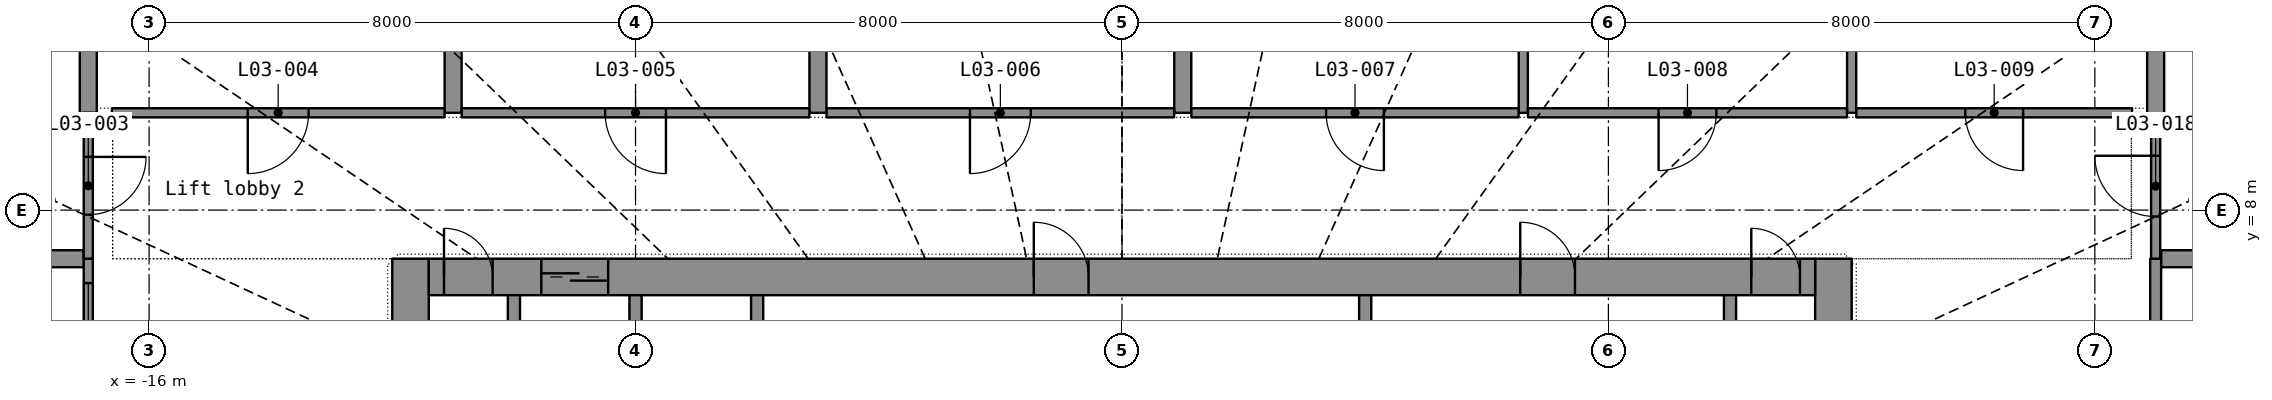
"""IFC4 building model, lengths in metres.
Left out: names, types, materials, properties, quantities, classifications, styles, units other than length and angle.
Written with IfcOpenShell. Run it as: python <this file> out.ifc"""

import sys

from ifc_helpers import new_model, si_unit, direction, frame, frame_2d, origin, place, context, subcontext, project, spatial, rectangle, extrude, element, fill, save


model = new_model("IFC4")
c1 = context("Model", 3, precision=1e-05, world=origin(), true_north=direction((0.0, 1.0)))
c2 = subcontext(c1, "Body", "Model", "MODEL_VIEW")
j1 = project(units=[si_unit("LENGTHUNIT", "METRE"), si_unit("PLANEANGLEUNIT", "RADIAN")], contexts=[c1])
p1 = place(None, origin())
s1 = spatial("IfcSite", under=j1, at=p1, CompositionType="ELEMENT")
p2 = place(p1, origin())
s2 = spatial("IfcBuilding", under=s1, at=p2, CompositionType="ELEMENT")
p3 = place(p2, frame((0.0, 0.0, 20.0)))
s3 = spatial("IfcBuildingStorey", under=s2, at=p3, CompositionType="ELEMENT", Elevation=20.0)
p4 = place(p3, frame((-11.7, -7.2, 0.0), z_axis=(0.0, 0.0, 1.0), x_axis=(0.0, 1.0, 0.0)))
e1 = element("IfcWall", 1, at=p4, inside=s3, PredefinedType="SHEAR", context=c2, shape_type="SweptSolid", body=[
    extrude(rectangle(XDim=14.4, YDim=0.6, at=frame_2d((7.2, 0.0))), origin(), (0.0, 0.0, 1.0), 4.1),
])
p5 = place(p4, frame((6.5, 0.0, 0.0)))
e2 = element("IfcOpeningElement", 2, at=p5, cuts=e1, PredefinedType="OPENING", context=c2, shape_type="SweptSolid", body=[
    extrude(rectangle(XDim=1.4, YDim=2.2, at=frame_2d((0.7, 1.1))), frame((0.0, 0.31, 0.0), z_axis=(0.0, -1.0, 0.0), x_axis=(1.0, 0.0, 0.0)), (0.0, 0.0, 1.0), 0.62),
])
p6 = place(p3, frame((11.7, -7.2, 0.0), z_axis=(0.0, 0.0, 1.0), x_axis=(0.0, 1.0, 0.0)))
e3 = element("IfcWall", 3, at=p6, inside=s3, PredefinedType="SHEAR", context=c2, shape_type="SweptSolid", body=[
    extrude(rectangle(XDim=14.4, YDim=0.6, at=frame_2d((7.2, 0.0))), origin(), (0.0, 0.0, 1.0), 4.1),
])
p7 = place(p6, frame((6.5, 0.0, 0.0)))
e4 = element("IfcOpeningElement", 4, at=p7, cuts=e3, PredefinedType="OPENING", context=c2, shape_type="SweptSolid", body=[
    extrude(rectangle(XDim=1.4, YDim=2.2, at=frame_2d((0.7, 1.1))), frame((0.0, 0.31, 0.0), z_axis=(0.0, -1.0, 0.0), x_axis=(1.0, 0.0, 0.0)), (0.0, 0.0, 1.0), 0.62),
])
p8 = place(p3, frame((-11.4, 6.9, 0.0), z_axis=(0.0, 0.0, 1.0), x_axis=(1.0, 0.0, 0.0)))
e5 = element("IfcWall", 5, at=p8, inside=s3, PredefinedType="SHEAR", context=c2, shape_type="SweptSolid", body=[
    extrude(rectangle(XDim=22.8, YDim=0.6, at=frame_2d((11.4, 0.0))), origin(), (0.0, 0.0, 1.0), 4.1),
])
p9 = place(p8, frame((1.85, 0.0, 0.0)))
e6 = element("IfcOpeningElement", 6, at=p9, cuts=e5, PredefinedType="OPENING", context=c2, shape_type="SweptSolid", body=[
    extrude(rectangle(XDim=1.1, YDim=2.2, at=frame_2d((0.55, 1.1))), frame((0.0, 0.31, 0.0), z_axis=(0.0, -1.0, 0.0), x_axis=(1.0, 0.0, 0.0)), (0.0, 0.0, 1.0), 0.62),
])
p10 = place(p8, frame((9.95, 0.0, 0.0)))
e7 = element("IfcOpeningElement", 7, at=p10, cuts=e5, PredefinedType="OPENING", context=c2, shape_type="SweptSolid", body=[
    extrude(rectangle(XDim=0.9, YDim=2.1, at=frame_2d((0.45, 1.05))), frame((0.0, 0.31, 0.0), z_axis=(0.0, -1.0, 0.0), x_axis=(1.0, 0.0, 0.0)), (0.0, 0.0, 1.0), 0.62),
])
p11 = place(p8, frame((17.95, 0.0, 0.0)))
e8 = element("IfcOpeningElement", 8, at=p11, cuts=e5, PredefinedType="OPENING", context=c2, shape_type="SweptSolid", body=[
    extrude(rectangle(XDim=0.9, YDim=2.1, at=frame_2d((0.45, 1.05))), frame((0.0, 0.31, 0.0), z_axis=(0.0, -1.0, 0.0), x_axis=(1.0, 0.0, 0.0)), (0.0, 0.0, 1.0), 0.62),
])
p12 = place(p8, frame((0.25, 0.0, 0.0)))
e9 = element("IfcOpeningElement", 9, at=p12, cuts=e5, PredefinedType="OPENING", context=c2, shape_type="SweptSolid", body=[
    extrude(rectangle(XDim=0.8, YDim=2.05, at=frame_2d((0.4, 1.025))), frame((0.0, 0.31, 0.0), z_axis=(0.0, -1.0, 0.0), x_axis=(1.0, 0.0, 0.0)), (0.0, 0.0, 1.0), 0.62),
])
p13 = place(p8, frame((21.75, 0.0, 0.0)))
e10 = element("IfcOpeningElement", 10, at=p13, cuts=e5, PredefinedType="OPENING", context=c2, shape_type="SweptSolid", body=[
    extrude(rectangle(XDim=0.8, YDim=2.05, at=frame_2d((0.4, 1.025))), frame((0.0, 0.31, 0.0), z_axis=(0.0, -1.0, 0.0), x_axis=(1.0, 0.0, 0.0)), (0.0, 0.0, 1.0), 0.62),
])
for number, where, z_axis, x_axis in (
    (11, (-10.0, 3.9, 0.0), (0.0, 0.0, 1.0), (0.0, 1.0, 0.0)),
    (12, (-8.0, 3.9, 0.0), (0.0, 0.0, 1.0), (0.0, 1.0, 0.0)),
    (13, (-6.0, 3.9, 0.0), (0.0, 0.0, 1.0), (0.0, 1.0, 0.0)),
    (14, (10.0, 3.9, 0.0), (0.0, 0.0, 1.0), (0.0, 1.0, 0.0)),
):
    element("IfcWall", number, at=place(p3, frame(where, z_axis=z_axis, x_axis=x_axis)), inside=s3, PredefinedType="SHEAR", context=c2, shape_type="SweptSolid", body=[
        extrude(rectangle(XDim=2.7, YDim=0.2, at=frame_2d((1.35, 0.0))), origin(), (0.0, 0.0, 1.0), 4.1),
    ])
p14 = place(p3, frame((4.0, 3.9, 0.0), z_axis=(0.0, 0.0, 1.0), x_axis=(0.0, 1.0, 0.0)))
e15 = element("IfcWall", 15, at=p14, inside=s3, PredefinedType="PARTITIONING", context=c2, shape_type="SweptSolid", body=[
    extrude(rectangle(XDim=2.7, YDim=0.2, at=frame_2d((1.35, 0.0))), origin(), (0.0, 0.0, 1.0), 4.1),
])
p15 = place(p3, frame((-17.0, 7.2, 0.0), z_axis=(0.0, 0.0, 1.0), x_axis=(0.0, -1.0, 0.0)))
e16 = element("IfcWall", 16, at=p15, inside=s3, PredefinedType="PARTITIONING", context=c2, shape_type="SweptSolid", body=[
    extrude(rectangle(XDim=14.4, YDim=0.15, at=frame_2d((7.2, 0.0))), origin(), (0.0, 0.0, 1.0), 3.3),
])
p16 = place(p15, frame((6.7, 0.0, 0.0)))
e17 = element("IfcOpeningElement", 17, at=p16, cuts=e16, PredefinedType="OPENING", context=c2, shape_type="SweptSolid", body=[
    extrude(rectangle(XDim=1.0, YDim=2.2, at=frame_2d((0.5, 1.1))), frame((0.0, 0.085, 0.0), z_axis=(0.0, -1.0, 0.0), x_axis=(1.0, 0.0, 0.0)), (0.0, 0.0, 1.0), 0.17),
])
p17 = place(p15, frame((0.4, 0.0, 1.0)))
e18 = element("IfcOpeningElement", 18, at=p17, cuts=e16, PredefinedType="OPENING", context=c2, shape_type="SweptSolid", body=[
    extrude(rectangle(XDim=2.4, YDim=1.2, at=frame_2d((1.2, 0.6))), frame((0.0, 0.085, 0.0), z_axis=(0.0, -1.0, 0.0), x_axis=(1.0, 0.0, 0.0)), (0.0, 0.0, 1.0), 0.17),
])
p18 = place(p3, frame((17.0, -7.2, 0.0), z_axis=(0.0, 0.0, 1.0), x_axis=(0.0, 1.0, 0.0)))
e19 = element("IfcWall", 19, at=p18, inside=s3, PredefinedType="PARTITIONING", context=c2, shape_type="SweptSolid", body=[
    extrude(rectangle(XDim=14.4, YDim=0.18, at=frame_2d((7.2, 0.0))), origin(), (0.0, 0.0, 1.0), 3.3),
])
p19 = place(p18, frame((6.725, 0.0, 0.0)))
e20 = element("IfcOpeningElement", 20, at=p19, cuts=e19, PredefinedType="OPENING", context=c2, shape_type="SweptSolid", body=[
    extrude(rectangle(XDim=0.95, YDim=2.15, at=frame_2d((0.475, 1.075))), frame((0.0, 0.1, 0.0), z_axis=(0.0, -1.0, 0.0), x_axis=(1.0, 0.0, 0.0)), (0.0, 0.0, 1.0), 0.2),
])
p20 = place(p3, frame((1.0, 9.6, 0.0), z_axis=(0.0, 0.0, 1.0), x_axis=(0.0, 1.0, 0.0)))
e21 = element("IfcWall", 21, at=p20, inside=s3, PredefinedType="PARTITIONING", context=c2, shape_type="SweptSolid", body=[
    extrude(rectangle(XDim=13.8, YDim=0.28, at=frame_2d((6.9, 0.0))), origin(), (0.0, 0.0, 1.0), 3.3),
])
p21 = place(p3, frame((-5.0, 9.6, 0.0), z_axis=(0.0, 0.0, 1.0), x_axis=(0.0, 1.0, 0.0)))
e22 = element("IfcWall", 22, at=p21, inside=s3, PredefinedType="PARTITIONING", context=c2, shape_type="SweptSolid", body=[
    extrude(rectangle(XDim=13.426, YDim=0.28, at=frame_2d((6.713, 0.0))), origin(), (0.0, 0.0, 1.0), 3.3),
])
p22 = place(p3, frame((6.6, 9.6, 0.0), z_axis=(0.0, 0.0, 1.0), x_axis=(0.0, 1.0, 0.0)))
e23 = element("IfcWall", 23, at=p22, inside=s3, PredefinedType="PARTITIONING", context=c2, shape_type="SweptSolid", body=[
    extrude(rectangle(XDim=13.196, YDim=0.15, at=frame_2d((6.598, 0.0))), origin(), (0.0, 0.0, 1.0), 3.3),
])
p23 = place(p3, frame((-11.0, 9.6, 0.0), z_axis=(0.0, 0.0, 1.0), x_axis=(0.0, 1.0, 0.0)))
e24 = element("IfcWall", 24, at=p23, inside=s3, PredefinedType="PARTITIONING", context=c2, shape_type="SweptSolid", body=[
    extrude(rectangle(XDim=11.962, YDim=0.28, at=frame_2d((5.981, 0.0))), origin(), (0.0, 0.0, 1.0), 3.3),
])
p24 = place(p3, frame((12.0, 9.6, 0.0), z_axis=(0.0, 0.0, 1.0), x_axis=(0.0, 1.0, 0.0)))
e25 = element("IfcWall", 25, at=p24, inside=s3, PredefinedType="PARTITIONING", context=c2, shape_type="SweptSolid", body=[
    extrude(rectangle(XDim=11.623, YDim=0.15, at=frame_2d((5.811, 0.0))), origin(), (0.0, 0.0, 1.0), 3.3),
])
p25 = place(p3, frame((-17.077, 7.2, 0.0), z_axis=(0.0, 0.0, 1.0), x_axis=(-1.0, 0.0, 0.0)))
e26 = element("IfcWall", 26, at=p25, inside=s3, PredefinedType="PARTITIONING", context=c2, shape_type="SweptSolid", body=[
    extrude(rectangle(XDim=10.086, YDim=0.28, at=frame_2d((5.043, 0.0))), origin(), (0.0, 0.0, 1.0), 3.3),
])
p26 = place(p25, frame((3.843, 0.0, 1.0)))
e27 = element("IfcOpeningElement", 27, at=p26, cuts=e26, PredefinedType="OPENING", context=c2, shape_type="SweptSolid", body=[
    extrude(rectangle(XDim=2.4, YDim=1.2, at=frame_2d((1.2, 0.6))), frame((0.0, 0.15, 0.0), z_axis=(0.0, -1.0, 0.0), x_axis=(1.0, 0.0, 0.0)), (0.0, 0.0, 1.0), 0.3),
])
p27 = place(p3, frame((27.163, 7.2, 0.0), z_axis=(0.0, 0.0, 1.0), x_axis=(-1.0, 0.0, 0.0)))
e28 = element("IfcWall", 28, at=p27, inside=s3, PredefinedType="PARTITIONING", context=c2, shape_type="SweptSolid", body=[
    extrude(rectangle(XDim=10.071, YDim=0.28, at=frame_2d((5.035, 0.0))), origin(), (0.0, 0.0, 1.0), 3.3),
])
p28 = place(p27, frame((3.835, 0.0, 1.0)))
e29 = element("IfcOpeningElement", 29, at=p28, cuts=e28, PredefinedType="OPENING", context=c2, shape_type="SweptSolid", body=[
    extrude(rectangle(XDim=2.4, YDim=1.2, at=frame_2d((1.2, 0.6))), frame((0.0, 0.15, 0.0), z_axis=(0.0, -1.0, 0.0), x_axis=(1.0, 0.0, 0.0)), (0.0, 0.0, 1.0), 0.3),
])
p29 = place(p3, frame((17.0, 9.588, 0.0), z_axis=(0.0, 0.0, 1.0), x_axis=(0.0, 1.0, 0.0)))
e30 = element("IfcWall", 30, at=p29, inside=s3, PredefinedType="PARTITIONING", context=c2, shape_type="SweptSolid", body=[
    extrude(rectangle(XDim=9.189, YDim=0.28, at=frame_2d((4.594, 0.0))), origin(), (0.0, 0.0, 1.0), 3.3),
])
p30 = place(p29, frame((3.394, 0.0, 1.0)))
e31 = element("IfcOpeningElement", 31, at=p30, cuts=e30, PredefinedType="OPENING", context=c2, shape_type="SweptSolid", body=[
    extrude(rectangle(XDim=2.4, YDim=1.2, at=frame_2d((1.2, 0.6))), frame((0.0, 0.15, 0.0), z_axis=(0.0, -1.0, 0.0), x_axis=(1.0, 0.0, 0.0)), (0.0, 0.0, 1.0), 0.3),
])
p31 = place(p3, frame((-17.0, 9.6, 0.0), z_axis=(0.0, 0.0, 1.0), x_axis=(0.0, 1.0, 0.0)))
e32 = element("IfcWall", 32, at=p31, inside=s3, PredefinedType="PARTITIONING", context=c2, shape_type="SweptSolid", body=[
    extrude(rectangle(XDim=9.177, YDim=0.28, at=frame_2d((4.588, 0.0))), origin(), (0.0, 0.0, 1.0), 3.3),
])
p32 = place(p3, frame((-5.142, 9.6, 0.0), z_axis=(0.0, 0.0, 1.0), x_axis=(-1.0, 0.0, 0.0)))
e33 = element("IfcWall", 33, at=p32, inside=s3, PredefinedType="PARTITIONING", context=c2, shape_type="SweptSolid", body=[
    extrude(rectangle(XDim=5.716, YDim=0.15, at=frame_2d((2.858, 0.0))), origin(), (0.0, 0.0, 1.0), 3.3),
])
p33 = place(p32, frame((2.358, 0.0, 0.0)))
e34 = element("IfcOpeningElement", 34, at=p33, cuts=e33, PredefinedType="OPENING", context=c2, shape_type="SweptSolid", body=[
    extrude(rectangle(XDim=1.0, YDim=2.2, at=frame_2d((0.5, 1.1))), frame((0.0, 0.085, 0.0), z_axis=(0.0, -1.0, 0.0), x_axis=(1.0, 0.0, 0.0)), (0.0, 0.0, 1.0), 0.17),
])
p34 = place(p3, frame((0.858, 9.6, 0.0), z_axis=(0.0, 0.0, 1.0), x_axis=(-1.0, 0.0, 0.0)))
e35 = element("IfcWall", 35, at=p34, inside=s3, PredefinedType="PARTITIONING", context=c2, shape_type="SweptSolid", body=[
    extrude(rectangle(XDim=5.716, YDim=0.15, at=frame_2d((2.858, 0.0))), origin(), (0.0, 0.0, 1.0), 3.3),
])
p35 = place(p34, frame((2.358, 0.0, 0.0)))
e36 = element("IfcOpeningElement", 36, at=p35, cuts=e35, PredefinedType="OPENING", context=c2, shape_type="SweptSolid", body=[
    extrude(rectangle(XDim=1.0, YDim=2.2, at=frame_2d((0.5, 1.1))), frame((0.0, 0.085, 0.0), z_axis=(0.0, -1.0, 0.0), x_axis=(1.0, 0.0, 0.0)), (0.0, 0.0, 1.0), 0.17),
])
p36 = place(p3, frame((-11.142, 9.6, 0.0), z_axis=(0.0, 0.0, 1.0), x_axis=(-1.0, 0.0, 0.0)))
e37 = element("IfcWall", 37, at=p36, inside=s3, PredefinedType="PARTITIONING", context=c2, shape_type="SweptSolid", body=[
    extrude(rectangle(XDim=5.47, YDim=0.15, at=frame_2d((2.735, 0.0))), origin(), (0.0, 0.0, 1.0), 3.3),
])
p37 = place(p36, frame((2.235, 0.0, 0.0)))
e38 = element("IfcOpeningElement", 38, at=p37, cuts=e37, PredefinedType="OPENING", context=c2, shape_type="SweptSolid", body=[
    extrude(rectangle(XDim=1.0, YDim=2.2, at=frame_2d((0.5, 1.1))), frame((0.0, 0.085, 0.0), z_axis=(0.0, -1.0, 0.0), x_axis=(1.0, 0.0, 0.0)), (0.0, 0.0, 1.0), 0.17),
])
p38 = place(p3, frame((6.523, 9.6, 0.0), z_axis=(0.0, 0.0, 1.0), x_axis=(-1.0, 0.0, 0.0)))
e39 = element("IfcWall", 39, at=p38, inside=s3, PredefinedType="PARTITIONING", context=c2, shape_type="SweptSolid", body=[
    extrude(rectangle(XDim=5.381, YDim=0.15, at=frame_2d((2.69, 0.0))), origin(), (0.0, 0.0, 1.0), 3.3),
])
p39 = place(p38, frame((2.216, 0.0, 0.0)))
e40 = element("IfcOpeningElement", 40, at=p39, cuts=e39, PredefinedType="OPENING", context=c2, shape_type="SweptSolid", body=[
    extrude(rectangle(XDim=0.95, YDim=2.15, at=frame_2d((0.475, 1.075))), frame((0.0, 0.085, 0.0), z_axis=(0.0, -1.0, 0.0), x_axis=(1.0, 0.0, 0.0)), (0.0, 0.0, 1.0), 0.17),
])
p40 = place(p3, frame((11.923, 9.6, 0.0), z_axis=(0.0, 0.0, 1.0), x_axis=(-1.0, 0.0, 0.0)))
e41 = element("IfcWall", 41, at=p40, inside=s3, PredefinedType="PARTITIONING", context=c2, shape_type="SweptSolid", body=[
    extrude(rectangle(XDim=5.246, YDim=0.15, at=frame_2d((2.623, 0.0))), origin(), (0.0, 0.0, 1.0), 3.3),
])
p41 = place(p40, frame((2.148, 0.0, 0.0)))
e42 = element("IfcOpeningElement", 42, at=p41, cuts=e41, PredefinedType="OPENING", context=c2, shape_type="SweptSolid", body=[
    extrude(rectangle(XDim=0.95, YDim=2.15, at=frame_2d((0.475, 1.075))), frame((0.0, 0.085, 0.0), z_axis=(0.0, -1.0, 0.0), x_axis=(1.0, 0.0, 0.0)), (0.0, 0.0, 1.0), 0.17),
])
p42 = place(p3, frame((16.612, 9.6, 0.0), z_axis=(0.0, 0.0, 1.0), x_axis=(-1.0, 0.0, 0.0)))
e43 = element("IfcWall", 43, at=p42, inside=s3, PredefinedType="PARTITIONING", context=c2, shape_type="SweptSolid", body=[
    extrude(rectangle(XDim=4.535, YDim=0.15, at=frame_2d((2.268, 0.0))), origin(), (0.0, 0.0, 1.0), 3.3),
])
p43 = place(p42, frame((1.792, 0.0, 0.0)))
e44 = element("IfcOpeningElement", 44, at=p43, cuts=e43, PredefinedType="OPENING", context=c2, shape_type="SweptSolid", body=[
    extrude(rectangle(XDim=0.95, YDim=2.15, at=frame_2d((0.475, 1.075))), frame((0.0, 0.085, 0.0), z_axis=(0.0, -1.0, 0.0), x_axis=(1.0, 0.0, 0.0)), (0.0, 0.0, 1.0), 0.17),
])
p44 = place(p3, frame((-17.0, 9.599, 0.0), z_axis=(0.0, 0.0, 1.0), x_axis=(0.0, -1.0, 0.0)))
e45 = element("IfcWall", 45, at=p44, inside=s3, PredefinedType="PARTITIONING", context=c2, shape_type="SweptSolid", body=[
    extrude(rectangle(XDim=2.398, YDim=0.15, at=frame_2d((1.199, 0.0))), origin(), (0.0, 0.0, 1.0), 3.3),
])
p45 = place(p44, frame((0.724, 0.0, 0.0)))
e46 = element("IfcOpeningElement", 46, at=p45, cuts=e45, PredefinedType="OPENING", context=c2, shape_type="SweptSolid", body=[
    extrude(rectangle(XDim=0.95, YDim=2.15, at=frame_2d((0.475, 1.075))), frame((0.0, 0.085, 0.0), z_axis=(0.0, -1.0, 0.0), x_axis=(1.0, 0.0, 0.0)), (0.0, 0.0, 1.0), 0.17),
])
p46 = place(p3, frame((17.0, 7.201, 0.0), z_axis=(0.0, 0.0, 1.0), x_axis=(0.0, 1.0, 0.0)))
e47 = element("IfcWall", 47, at=p46, inside=s3, PredefinedType="PARTITIONING", context=c2, shape_type="SweptSolid", body=[
    extrude(rectangle(XDim=2.386, YDim=0.15, at=frame_2d((1.193, 0.0))), origin(), (0.0, 0.0, 1.0), 3.3),
])
p47 = place(p46, frame((0.693, 0.0, 0.0)))
e48 = element("IfcOpeningElement", 48, at=p47, cuts=e47, PredefinedType="OPENING", context=c2, shape_type="SweptSolid", body=[
    extrude(rectangle(XDim=1.0, YDim=2.2, at=frame_2d((0.5, 1.1))), frame((0.0, 0.085, 0.0), z_axis=(0.0, -1.0, 0.0), x_axis=(1.0, 0.0, 0.0)), (0.0, 0.0, 1.0), 0.17),
])
p48 = place(p9, origin())
e49 = element("IfcDoor", 49, at=p48, inside=s3, OperationType="DOUBLE_DOOR_SLIDING", PredefinedType="DOOR", context=c2, shape_type="SweptSolid", body=[
    extrude(rectangle(XDim=1.1, YDim=2.2, at=frame_2d((0.55, 1.1))), frame((0.0, 0.025, 0.0), z_axis=(0.0, -1.0, 0.0), x_axis=(1.0, 0.0, 0.0)), (0.0, 0.0, 1.0), 0.05),
])
fill(e6, e49)
p49 = place(p10, origin())
e50 = element("IfcDoor", 50, at=p49, inside=s3, OperationType="SINGLE_SWING_LEFT", PredefinedType="DOOR", context=c2, shape_type="SweptSolid", body=[
    extrude(rectangle(XDim=0.9, YDim=2.1, at=frame_2d((0.45, 1.05))), frame((0.0, 0.025, 0.0), z_axis=(0.0, -1.0, 0.0), x_axis=(1.0, 0.0, 0.0)), (0.0, 0.0, 1.0), 0.05),
])
fill(e7, e50)
p50 = place(p11, origin())
e51 = element("IfcDoor", 51, at=p50, inside=s3, OperationType="SINGLE_SWING_LEFT", PredefinedType="DOOR", context=c2, shape_type="SweptSolid", body=[
    extrude(rectangle(XDim=0.9, YDim=2.1, at=frame_2d((0.45, 1.05))), frame((0.0, 0.025, 0.0), z_axis=(0.0, -1.0, 0.0), x_axis=(1.0, 0.0, 0.0)), (0.0, 0.0, 1.0), 0.05),
])
fill(e8, e51)
p51 = place(p12, origin())
e52 = element("IfcDoor", 52, at=p51, inside=s3, OperationType="SINGLE_SWING_LEFT", PredefinedType="DOOR", context=c2, shape_type="SweptSolid", body=[
    extrude(rectangle(XDim=0.8, YDim=2.05, at=frame_2d((0.4, 1.025))), frame((0.0, 0.025, 0.0), z_axis=(0.0, -1.0, 0.0), x_axis=(1.0, 0.0, 0.0)), (0.0, 0.0, 1.0), 0.05),
])
fill(e9, e52)
p52 = place(p13, origin())
e53 = element("IfcDoor", 53, at=p52, inside=s3, OperationType="SINGLE_SWING_LEFT", PredefinedType="DOOR", context=c2, shape_type="SweptSolid", body=[
    extrude(rectangle(XDim=0.8, YDim=2.05, at=frame_2d((0.4, 1.025))), frame((0.0, 0.025, 0.0), z_axis=(0.0, -1.0, 0.0), x_axis=(1.0, 0.0, 0.0)), (0.0, 0.0, 1.0), 0.05),
])
fill(e10, e53)
p53 = place(p45, origin())
e54 = element("IfcDoor", 54, at=p53, inside=s3, OperationType="SINGLE_SWING_LEFT", PredefinedType="DOOR", context=c2, shape_type="SweptSolid", body=[
    extrude(rectangle(XDim=0.95, YDim=2.15, at=frame_2d((0.475, 1.075))), frame((0.0, 0.025, 0.0), z_axis=(0.0, -1.0, 0.0), x_axis=(1.0, 0.0, 0.0)), (0.0, 0.0, 1.0), 0.05),
])
fill(e46, e54)
p54 = place(p37, origin())
e55 = element("IfcDoor", 55, at=p54, inside=s3, OperationType="SINGLE_SWING_RIGHT", PredefinedType="DOOR", context=c2, shape_type="SweptSolid", body=[
    extrude(rectangle(XDim=1.0, YDim=2.2, at=frame_2d((0.5, 1.1))), frame((0.0, 0.025, 0.0), z_axis=(0.0, -1.0, 0.0), x_axis=(1.0, 0.0, 0.0)), (0.0, 0.0, 1.0), 0.05),
])
fill(e38, e55)
p55 = place(p33, origin())
e56 = element("IfcDoor", 56, at=p55, inside=s3, OperationType="SINGLE_SWING_LEFT", PredefinedType="DOOR", context=c2, shape_type="SweptSolid", body=[
    extrude(rectangle(XDim=1.0, YDim=2.2, at=frame_2d((0.5, 1.1))), frame((0.0, 0.025, 0.0), z_axis=(0.0, -1.0, 0.0), x_axis=(1.0, 0.0, 0.0)), (0.0, 0.0, 1.0), 0.05),
])
fill(e34, e56)
p56 = place(p35, origin())
e57 = element("IfcDoor", 57, at=p56, inside=s3, OperationType="SINGLE_SWING_RIGHT", PredefinedType="DOOR", context=c2, shape_type="SweptSolid", body=[
    extrude(rectangle(XDim=1.0, YDim=2.2, at=frame_2d((0.5, 1.1))), frame((0.0, 0.025, 0.0), z_axis=(0.0, -1.0, 0.0), x_axis=(1.0, 0.0, 0.0)), (0.0, 0.0, 1.0), 0.05),
])
fill(e36, e57)
p57 = place(p39, origin())
e58 = element("IfcDoor", 58, at=p57, inside=s3, OperationType="SINGLE_SWING_LEFT", PredefinedType="DOOR", context=c2, shape_type="SweptSolid", body=[
    extrude(rectangle(XDim=0.95, YDim=2.15, at=frame_2d((0.475, 1.075))), frame((0.0, 0.025, 0.0), z_axis=(0.0, -1.0, 0.0), x_axis=(1.0, 0.0, 0.0)), (0.0, 0.0, 1.0), 0.05),
])
fill(e40, e58)
p58 = place(p41, origin())
e59 = element("IfcDoor", 59, at=p58, inside=s3, OperationType="SINGLE_SWING_RIGHT", PredefinedType="DOOR", context=c2, shape_type="SweptSolid", body=[
    extrude(rectangle(XDim=0.95, YDim=2.15, at=frame_2d((0.475, 1.075))), frame((0.0, 0.025, 0.0), z_axis=(0.0, -1.0, 0.0), x_axis=(1.0, 0.0, 0.0)), (0.0, 0.0, 1.0), 0.05),
])
fill(e42, e59)
p59 = place(p43, origin())
e60 = element("IfcDoor", 60, at=p59, inside=s3, OperationType="SINGLE_SWING_LEFT", PredefinedType="DOOR", context=c2, shape_type="SweptSolid", body=[
    extrude(rectangle(XDim=0.95, YDim=2.15, at=frame_2d((0.475, 1.075))), frame((0.0, 0.025, 0.0), z_axis=(0.0, -1.0, 0.0), x_axis=(1.0, 0.0, 0.0)), (0.0, 0.0, 1.0), 0.05),
])
fill(e44, e60)
p60 = place(p47, origin())
e61 = element("IfcDoor", 61, at=p60, inside=s3, OperationType="SINGLE_SWING_RIGHT", PredefinedType="DOOR", context=c2, shape_type="SweptSolid", body=[
    extrude(rectangle(XDim=1.0, YDim=2.2, at=frame_2d((0.5, 1.1))), frame((0.0, 0.025, 0.0), z_axis=(0.0, -1.0, 0.0), x_axis=(1.0, 0.0, 0.0)), (0.0, 0.0, 1.0), 0.05),
])
fill(e48, e61)
p61 = place(p17, origin())
e62 = element("IfcWindow", 62, at=p61, inside=s3, PartitioningType="SINGLE_PANEL", PredefinedType="WINDOW", context=c2, shape_type="SweptSolid", body=[
    extrude(rectangle(XDim=2.4, YDim=1.2, at=frame_2d((1.2, 0.6))), frame((0.0, 0.03, 0.0), z_axis=(0.0, -1.0, 0.0), x_axis=(1.0, 0.0, 0.0)), (0.0, 0.0, 1.0), 0.06),
])
fill(e18, e62)
save(model, sys.argv[1])
